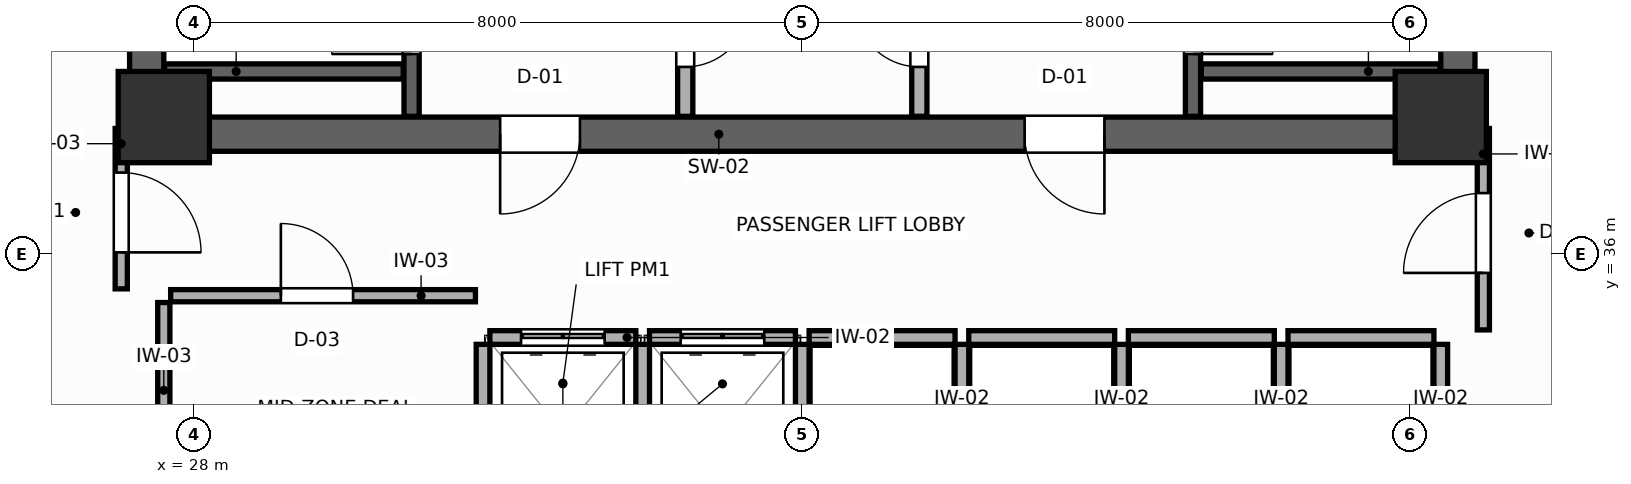
"""IFC4 building model, lengths in metres.
Left out: names, types, materials, properties, quantities, classifications, styles, units other than length and angle.
Written with IfcOpenShell. Run it as: python <this file> out.ifc"""

import sys

from ifc_helpers import new_model, si_unit, direction, frame, frame_2d, origin, origin_2d, place, context, subcontext, project, spatial, rectangle, extrude, source, transform, mapped, element, fill, save


model = new_model("IFC4")
c1 = context("Model", 3, precision=1e-05, world=origin(), true_north=direction((0.0, 1.0)))
c2 = subcontext(c1, "Body", "Model", "MODEL_VIEW")
j1 = project(units=[si_unit("LENGTHUNIT", "METRE"), si_unit("PLANEANGLEUNIT", "RADIAN")], contexts=[c1])
p1 = place(None, origin())
s1 = spatial("IfcSite", under=j1, at=p1, CompositionType="ELEMENT")
p2 = place(p1, origin())
s2 = spatial("IfcBuilding", under=s1, at=p2, CompositionType="ELEMENT")
p3 = place(p2, frame((0.0, 0.0, 109.8)))
s3 = spatial("IfcBuildingStorey", under=s2, at=p3, CompositionType="ELEMENT", Elevation=109.8)
p4 = place(p3, frame((27.15, 37.575, 0.0), z_axis=(0.0, 0.0, 1.0), x_axis=(1.0, 0.0, 0.0)))
e1 = element("IfcWall", 1, at=p4, inside=s3, PredefinedType="SHEAR", context=c2, shape_type="SweptSolid", body=[
    extrude(rectangle(XDim=17.7, YDim=0.45, at=frame_2d((8.85, 0.0))), origin(), (0.0, 0.0, 1.0), 3.6),
])
p5 = place(p4, frame((4.875, 0.0, 0.0)))
e2 = element("IfcOpeningElement", 2, at=p5, cuts=e1, PredefinedType="OPENING", context=c2, shape_type="SweptSolid", body=[
    extrude(rectangle(XDim=1.05, YDim=2.1, at=frame_2d((0.525, 1.05))), frame((0.0, 0.235, 0.0), z_axis=(0.0, -1.0, 0.0), x_axis=(1.0, 0.0, 0.0)), (0.0, 0.0, 1.0), 0.47),
])
p6 = place(p4, frame((11.775, 0.0, 0.0)))
e3 = element("IfcOpeningElement", 3, at=p6, cuts=e1, PredefinedType="OPENING", context=c2, shape_type="SweptSolid", body=[
    extrude(rectangle(XDim=1.05, YDim=2.1, at=frame_2d((0.525, 1.05))), frame((0.0, 0.235, 0.0), z_axis=(0.0, -1.0, 0.0), x_axis=(1.0, 0.0, 0.0)), (0.0, 0.0, 1.0), 0.47),
])
for number, where, z_axis, x_axis in (
    (4, (27.375, 37.8, 0.0), (0.0, 0.0, 1.0), (0.0, 1.0, 0.0)),
    (5, (44.625, 37.8, 0.0), (0.0, 0.0, 1.0), (0.0, 1.0, 0.0)),
):
    element("IfcWall", number, at=place(p3, frame(where, z_axis=z_axis, x_axis=x_axis)), inside=s3, PredefinedType="SHEAR", context=c2, shape_type="SweptSolid", body=[
        extrude(rectangle(XDim=9.0, YDim=0.45, at=frame_2d((4.5, 0.0))), origin(), (0.0, 0.0, 1.0), 3.6),
    ])
m1 = source(origin(), c2, "Body", "SweptSolid", [
    extrude(rectangle(XDim=1.2, YDim=1.2, at=origin_2d()), origin(), (0.0, 0.0, 1.0), 3.6),
])
for number, where, z_axis, x_axis in (
    (6, (27.6, 37.8, 0.0), (0.0, 0.0, 1.0), (1.0, 0.0, 0.0)),
    (7, (44.4, 37.8, 0.0), (0.0, 0.0, 1.0), (1.0, 0.0, 0.0)),
):
    element("IfcColumn", number, at=place(p3, frame(where, z_axis=z_axis, x_axis=x_axis)), inside=s3, PredefinedType="COLUMN", context=c2, shape_type="MappedRepresentation", body=[
        mapped(m1, transform((0.0, 0.0, 0.0), scale=1.0)),
    ])
p7 = place(p3, frame((30.86, 37.81, 0.0), z_axis=(0.0, 0.0, 1.0), x_axis=(0.0, 1.0, 0.0)))
e8 = element("IfcWall", 8, at=p7, inside=s3, PredefinedType="SHEAR", context=c2, shape_type="SweptSolid", body=[
    extrude(rectangle(XDim=8.98, YDim=0.2, at=frame_2d((4.49, 0.0))), origin(), (0.0, 0.0, 1.0), 3.6),
])
p8 = place(p7, frame((0.82, 0.0, 0.0)))
e9 = element("IfcOpeningElement", 9, at=p8, cuts=e8, PredefinedType="OPENING", context=c2, shape_type="SweptSolid", body=[
    extrude(rectangle(XDim=1.05, YDim=2.1, at=frame_2d((0.525, 1.05))), frame((0.0, 0.11, 0.0), z_axis=(0.0, -1.0, 0.0), x_axis=(1.0, 0.0, 0.0)), (0.0, 0.0, 1.0), 0.22),
])
p9 = place(p3, frame((27.61, 38.4, 0.0), z_axis=(0.0, 0.0, 1.0), x_axis=(1.0, 0.0, 0.0)))
e10 = element("IfcWall", 10, at=p9, inside=s3, PredefinedType="SHEAR", context=c2, shape_type="SweptSolid", body=[
    extrude(rectangle(XDim=3.14, YDim=0.2, at=frame_2d((1.57, 0.0))), origin(), (0.0, 0.0, 1.0), 3.6),
])
p10 = place(p3, frame((41.14, 37.81, 0.0), z_axis=(0.0, 0.0, 1.0), x_axis=(0.0, 1.0, 0.0)))
e11 = element("IfcWall", 11, at=p10, inside=s3, PredefinedType="SHEAR", context=c2, shape_type="SweptSolid", body=[
    extrude(rectangle(XDim=8.98, YDim=0.2, at=frame_2d((4.49, 0.0))), origin(), (0.0, 0.0, 1.0), 3.6),
])
p11 = place(p10, frame((0.82, 0.0, 0.0)))
e12 = element("IfcOpeningElement", 12, at=p11, cuts=e11, PredefinedType="OPENING", context=c2, shape_type="SweptSolid", body=[
    extrude(rectangle(XDim=1.05, YDim=2.1, at=frame_2d((0.525, 1.05))), frame((0.0, 0.11, 0.0), z_axis=(0.0, -1.0, 0.0), x_axis=(1.0, 0.0, 0.0)), (0.0, 0.0, 1.0), 0.22),
])
p12 = place(p3, frame((41.25, 38.4, 0.0), z_axis=(0.0, 0.0, 1.0), x_axis=(1.0, 0.0, 0.0)))
e13 = element("IfcWall", 13, at=p12, inside=s3, PredefinedType="SHEAR", context=c2, shape_type="SweptSolid", body=[
    extrude(rectangle(XDim=3.14, YDim=0.2, at=frame_2d((1.57, 0.0))), origin(), (0.0, 0.0, 1.0), 3.6),
])
p13 = place(p3, frame((34.46, 37.81, 0.0), z_axis=(0.0, 0.0, 1.0), x_axis=(0.0, 1.0, 0.0)))
e14 = element("IfcWall", 14, at=p13, inside=s3, PredefinedType="PARTITIONING", context=c2, shape_type="SweptSolid", body=[
    extrude(rectangle(XDim=8.98, YDim=0.2, at=frame_2d((4.49, 0.0))), origin(), (0.0, 0.0, 1.0), 3.4),
])
p14 = place(p13, frame((0.65, 0.0, 0.0)))
e15 = element("IfcOpeningElement", 15, at=p14, cuts=e14, PredefinedType="OPENING", context=c2, shape_type="SweptSolid", body=[
    extrude(rectangle(XDim=0.85, YDim=2.05, at=frame_2d((0.425, 1.025))), frame((0.0, 0.11, 0.0), z_axis=(0.0, -1.0, 0.0), x_axis=(1.0, 0.0, 0.0)), (0.0, 0.0, 1.0), 0.22),
])
p15 = place(p3, frame((37.54, 37.81, 0.0), z_axis=(0.0, 0.0, 1.0), x_axis=(0.0, 1.0, 0.0)))
e16 = element("IfcWall", 16, at=p15, inside=s3, PredefinedType="PARTITIONING", context=c2, shape_type="SweptSolid", body=[
    extrude(rectangle(XDim=8.98, YDim=0.2, at=frame_2d((4.49, 0.0))), origin(), (0.0, 0.0, 1.0), 3.4),
])
p16 = place(p15, frame((0.65, 0.0, 0.0)))
e17 = element("IfcOpeningElement", 17, at=p16, cuts=e16, PredefinedType="OPENING", context=c2, shape_type="SweptSolid", body=[
    extrude(rectangle(XDim=0.85, YDim=2.05, at=frame_2d((0.425, 1.025))), frame((0.0, 0.11, 0.0), z_axis=(0.0, -1.0, 0.0), x_axis=(1.0, 0.0, 0.0)), (0.0, 0.0, 1.0), 0.22),
])
p17 = place(p3, frame((31.89, 34.9, 0.0), z_axis=(0.0, 0.0, 1.0), x_axis=(1.0, 0.0, 0.0)))
e18 = element("IfcWall", 18, at=p17, inside=s3, PredefinedType="PARTITIONING", context=c2, shape_type="SweptSolid", body=[
    extrude(rectangle(XDim=1.92, YDim=0.18, at=frame_2d((0.96, 0.0))), origin(), (0.0, 0.0, 1.0), 3.4),
])
p18 = place(p17, frame((0.41, 0.0, 0.0)))
e19 = element("IfcOpeningElement", 19, at=p18, cuts=e18, PredefinedType="OPENING", context=c2, shape_type="SweptSolid", body=[
    extrude(rectangle(XDim=1.1, YDim=2.1, at=frame_2d((0.55, 1.05))), frame((0.0, 0.1, 0.0), z_axis=(0.0, -1.0, 0.0), x_axis=(1.0, 0.0, 0.0)), (0.0, 0.0, 1.0), 0.2),
])
p19 = place(p3, frame((31.8, 32.49, 0.0), z_axis=(0.0, 0.0, 1.0), x_axis=(0.0, 1.0, 0.0)))
e20 = element("IfcWall", 20, at=p19, inside=s3, PredefinedType="PARTITIONING", context=c2, shape_type="SweptSolid", body=[
    extrude(rectangle(XDim=2.32, YDim=0.18, at=frame_2d((1.16, 0.0))), origin(), (0.0, 0.0, 1.0), 3.4),
])
p20 = place(p3, frame((33.99, 34.9, 0.0), z_axis=(0.0, 0.0, 1.0), x_axis=(1.0, 0.0, 0.0)))
e21 = element("IfcWall", 21, at=p20, inside=s3, PredefinedType="PARTITIONING", context=c2, shape_type="SweptSolid", body=[
    extrude(rectangle(XDim=1.92, YDim=0.18, at=frame_2d((0.96, 0.0))), origin(), (0.0, 0.0, 1.0), 3.4),
])
p21 = place(p20, frame((0.41, 0.0, 0.0)))
e22 = element("IfcOpeningElement", 22, at=p21, cuts=e21, PredefinedType="OPENING", context=c2, shape_type="SweptSolid", body=[
    extrude(rectangle(XDim=1.1, YDim=2.1, at=frame_2d((0.55, 1.05))), frame((0.0, 0.1, 0.0), z_axis=(0.0, -1.0, 0.0), x_axis=(1.0, 0.0, 0.0)), (0.0, 0.0, 1.0), 0.2),
])
p22 = place(p3, frame((33.9, 32.49, 0.0), z_axis=(0.0, 0.0, 1.0), x_axis=(0.0, 1.0, 0.0)))
e23 = element("IfcWall", 23, at=p22, inside=s3, PredefinedType="PARTITIONING", context=c2, shape_type="SweptSolid", body=[
    extrude(rectangle(XDim=2.32, YDim=0.18, at=frame_2d((1.16, 0.0))), origin(), (0.0, 0.0, 1.0), 3.4),
])
p23 = place(p3, frame((36.09, 34.9, 0.0), z_axis=(0.0, 0.0, 1.0), x_axis=(1.0, 0.0, 0.0)))
e24 = element("IfcWall", 24, at=p23, inside=s3, PredefinedType="PARTITIONING", context=c2, shape_type="SweptSolid", body=[
    extrude(rectangle(XDim=1.92, YDim=0.18, at=frame_2d((0.96, 0.0))), origin(), (0.0, 0.0, 1.0), 3.4),
])
p24 = place(p3, frame((36.0, 32.49, 0.0), z_axis=(0.0, 0.0, 1.0), x_axis=(0.0, 1.0, 0.0)))
e25 = element("IfcWall", 25, at=p24, inside=s3, PredefinedType="PARTITIONING", context=c2, shape_type="SweptSolid", body=[
    extrude(rectangle(XDim=2.32, YDim=0.18, at=frame_2d((1.16, 0.0))), origin(), (0.0, 0.0, 1.0), 3.4),
])
p25 = place(p3, frame((38.19, 34.9, 0.0), z_axis=(0.0, 0.0, 1.0), x_axis=(1.0, 0.0, 0.0)))
e26 = element("IfcWall", 26, at=p25, inside=s3, PredefinedType="PARTITIONING", context=c2, shape_type="SweptSolid", body=[
    extrude(rectangle(XDim=1.92, YDim=0.18, at=frame_2d((0.96, 0.0))), origin(), (0.0, 0.0, 1.0), 3.4),
])
p26 = place(p3, frame((38.1, 32.49, 0.0), z_axis=(0.0, 0.0, 1.0), x_axis=(0.0, 1.0, 0.0)))
e27 = element("IfcWall", 27, at=p26, inside=s3, PredefinedType="PARTITIONING", context=c2, shape_type="SweptSolid", body=[
    extrude(rectangle(XDim=2.32, YDim=0.18, at=frame_2d((1.16, 0.0))), origin(), (0.0, 0.0, 1.0), 3.4),
])
p27 = place(p3, frame((40.29, 34.9, 0.0), z_axis=(0.0, 0.0, 1.0), x_axis=(1.0, 0.0, 0.0)))
e28 = element("IfcWall", 28, at=p27, inside=s3, PredefinedType="PARTITIONING", context=c2, shape_type="SweptSolid", body=[
    extrude(rectangle(XDim=1.92, YDim=0.18, at=frame_2d((0.96, 0.0))), origin(), (0.0, 0.0, 1.0), 3.4),
])
p28 = place(p3, frame((40.2, 32.49, 0.0), z_axis=(0.0, 0.0, 1.0), x_axis=(0.0, 1.0, 0.0)))
e29 = element("IfcWall", 29, at=p28, inside=s3, PredefinedType="PARTITIONING", context=c2, shape_type="SweptSolid", body=[
    extrude(rectangle(XDim=2.32, YDim=0.18, at=frame_2d((1.16, 0.0))), origin(), (0.0, 0.0, 1.0), 3.4),
])
p29 = place(p3, frame((42.39, 34.9, 0.0), z_axis=(0.0, 0.0, 1.0), x_axis=(1.0, 0.0, 0.0)))
e30 = element("IfcWall", 30, at=p29, inside=s3, PredefinedType="PARTITIONING", context=c2, shape_type="SweptSolid", body=[
    extrude(rectangle(XDim=1.92, YDim=0.18, at=frame_2d((0.96, 0.0))), origin(), (0.0, 0.0, 1.0), 3.4),
])
for number, where, z_axis, x_axis in (
    (31, (42.3, 32.49, 0.0), (0.0, 0.0, 1.0), (0.0, 1.0, 0.0)),
    (32, (44.4, 32.49, 0.0), (0.0, 0.0, 1.0), (0.0, 1.0, 0.0)),
):
    element("IfcWall", number, at=place(p3, frame(where, z_axis=z_axis, x_axis=x_axis)), inside=s3, PredefinedType="PARTITIONING", context=c2, shape_type="SweptSolid", body=[
        extrude(rectangle(XDim=2.32, YDim=0.18, at=frame_2d((1.16, 0.0))), origin(), (0.0, 0.0, 1.0), 3.4),
    ])
p30 = place(p3, frame((27.6, 33.05, 0.0), z_axis=(0.0, 0.0, 1.0), x_axis=(0.0, 1.0, 0.0)))
e33 = element("IfcWall", 33, at=p30, inside=s3, PredefinedType="PARTITIONING", context=c2, shape_type="SweptSolid", body=[
    extrude(rectangle(XDim=2.31, YDim=0.16, at=frame_2d((1.155, 0.0))), origin(), (0.0, 0.0, 1.0), 3.4),
])
p31 = place(p3, frame((27.69, 35.45, 0.0), z_axis=(0.0, 0.0, 1.0), x_axis=(1.0, 0.0, 0.0)))
e34 = element("IfcWall", 34, at=p31, inside=s3, PredefinedType="PARTITIONING", context=c2, shape_type="SweptSolid", body=[
    extrude(rectangle(XDim=4.01, YDim=0.16, at=frame_2d((2.005, 0.0))), origin(), (0.0, 0.0, 1.0), 3.4),
])
p32 = place(p31, frame((1.45, 0.0, 0.0)))
e35 = element("IfcOpeningElement", 35, at=p32, cuts=e34, PredefinedType="OPENING", context=c2, shape_type="SweptSolid", body=[
    extrude(rectangle(XDim=0.95, YDim=2.05, at=frame_2d((0.475, 1.025))), frame((0.0, 0.09, 0.0), z_axis=(0.0, -1.0, 0.0), x_axis=(1.0, 0.0, 0.0)), (0.0, 0.0, 1.0), 0.18),
])
p33 = place(p3, frame((27.04, 35.54, 0.0), z_axis=(0.0, 0.0, 1.0), x_axis=(0.0, 1.0, 0.0)))
e36 = element("IfcWall", 36, at=p33, inside=s3, PredefinedType="PARTITIONING", context=c2, shape_type="SweptSolid", body=[
    extrude(rectangle(XDim=2.11, YDim=0.16, at=frame_2d((1.055, 0.0))), origin(), (0.0, 0.0, 1.0), 3.4),
])
p34 = place(p33, frame((0.48, 0.0, 0.0)))
e37 = element("IfcOpeningElement", 37, at=p34, cuts=e36, PredefinedType="OPENING", context=c2, shape_type="SweptSolid", body=[
    extrude(rectangle(XDim=1.05, YDim=2.1, at=frame_2d((0.525, 1.05))), frame((0.0, 0.09, 0.0), z_axis=(0.0, -1.0, 0.0), x_axis=(1.0, 0.0, 0.0)), (0.0, 0.0, 1.0), 0.18),
])
p35 = place(p3, frame((44.96, 35.0, 0.0), z_axis=(0.0, 0.0, 1.0), x_axis=(0.0, 1.0, 0.0)))
e38 = element("IfcWall", 38, at=p35, inside=s3, PredefinedType="PARTITIONING", context=c2, shape_type="SweptSolid", body=[
    extrude(rectangle(XDim=2.65, YDim=0.16, at=frame_2d((1.325, 0.0))), origin(), (0.0, 0.0, 1.0), 3.4),
])
p36 = place(p35, frame((0.75, 0.0, 0.0)))
e39 = element("IfcOpeningElement", 39, at=p36, cuts=e38, PredefinedType="OPENING", context=c2, shape_type="SweptSolid", body=[
    extrude(rectangle(XDim=1.05, YDim=2.1, at=frame_2d((0.525, 1.05))), frame((0.0, 0.09, 0.0), z_axis=(0.0, -1.0, 0.0), x_axis=(1.0, 0.0, 0.0)), (0.0, 0.0, 1.0), 0.18),
])
p37 = place(p8, origin())
e40 = element("IfcDoor", 40, at=p37, inside=s3, OperationType="SINGLE_SWING_LEFT", PredefinedType="DOOR", context=c2, shape_type="SweptSolid", body=[
    extrude(rectangle(XDim=1.05, YDim=2.1, at=frame_2d((0.525, 1.05))), frame((0.0, 0.025, 0.0), z_axis=(0.0, -1.0, 0.0), x_axis=(1.0, 0.0, 0.0)), (0.0, 0.0, 1.0), 0.05),
])
fill(e9, e40)
p38 = place(p11, frame((1.05, 0.0, 0.0), z_axis=(0.0, 0.0, 1.0), x_axis=(-1.0, 0.0, 0.0)))
e41 = element("IfcDoor", 41, at=p38, inside=s3, OperationType="SINGLE_SWING_RIGHT", PredefinedType="DOOR", context=c2, shape_type="SweptSolid", body=[
    extrude(rectangle(XDim=1.05, YDim=2.1, at=frame_2d((0.525, 1.05))), frame((0.0, 0.025, 0.0), z_axis=(0.0, -1.0, 0.0), x_axis=(1.0, 0.0, 0.0)), (0.0, 0.0, 1.0), 0.05),
])
fill(e12, e41)
p39 = place(p14, frame((0.85, 0.0, 0.0), z_axis=(0.0, 0.0, 1.0), x_axis=(-1.0, 0.0, 0.0)))
e42 = element("IfcDoor", 42, at=p39, inside=s3, OperationType="SINGLE_SWING_LEFT", PredefinedType="DOOR", context=c2, shape_type="SweptSolid", body=[
    extrude(rectangle(XDim=0.85, YDim=2.05, at=frame_2d((0.425, 1.025))), frame((0.0, 0.025, 0.0), z_axis=(0.0, -1.0, 0.0), x_axis=(1.0, 0.0, 0.0)), (0.0, 0.0, 1.0), 0.05),
])
fill(e15, e42)
p40 = place(p16, origin())
e43 = element("IfcDoor", 43, at=p40, inside=s3, OperationType="SINGLE_SWING_RIGHT", PredefinedType="DOOR", context=c2, shape_type="SweptSolid", body=[
    extrude(rectangle(XDim=0.85, YDim=2.05, at=frame_2d((0.425, 1.025))), frame((0.0, 0.025, 0.0), z_axis=(0.0, -1.0, 0.0), x_axis=(1.0, 0.0, 0.0)), (0.0, 0.0, 1.0), 0.05),
])
fill(e17, e43)
p41 = place(p18, origin())
e44 = element("IfcDoor", 44, at=p41, inside=s3, OperationType="DOUBLE_DOOR_SLIDING", PredefinedType="DOOR", context=c2, shape_type="SweptSolid", body=[
    extrude(rectangle(XDim=1.1, YDim=2.1, at=frame_2d((0.55, 1.05))), frame((0.0, 0.025, 0.0), z_axis=(0.0, -1.0, 0.0), x_axis=(1.0, 0.0, 0.0)), (0.0, 0.0, 1.0), 0.05),
])
fill(e19, e44)
p42 = place(p21, origin())
e45 = element("IfcDoor", 45, at=p42, inside=s3, OperationType="DOUBLE_DOOR_SLIDING", PredefinedType="DOOR", context=c2, shape_type="SweptSolid", body=[
    extrude(rectangle(XDim=1.1, YDim=2.1, at=frame_2d((0.55, 1.05))), frame((0.0, 0.025, 0.0), z_axis=(0.0, -1.0, 0.0), x_axis=(1.0, 0.0, 0.0)), (0.0, 0.0, 1.0), 0.05),
])
fill(e22, e45)
p43 = place(p32, origin())
e46 = element("IfcDoor", 46, at=p43, inside=s3, OperationType="SINGLE_SWING_LEFT", PredefinedType="DOOR", context=c2, shape_type="SweptSolid", body=[
    extrude(rectangle(XDim=0.95, YDim=2.05, at=frame_2d((0.475, 1.025))), frame((0.0, 0.025, 0.0), z_axis=(0.0, -1.0, 0.0), x_axis=(1.0, 0.0, 0.0)), (0.0, 0.0, 1.0), 0.05),
])
fill(e35, e46)
p44 = place(p34, frame((1.05, 0.0, 0.0), z_axis=(0.0, 0.0, 1.0), x_axis=(-1.0, 0.0, 0.0)))
e47 = element("IfcDoor", 47, at=p44, inside=s3, OperationType="SINGLE_SWING_RIGHT", PredefinedType="DOOR", context=c2, shape_type="SweptSolid", body=[
    extrude(rectangle(XDim=1.05, YDim=2.1, at=frame_2d((0.525, 1.05))), frame((0.0, 0.025, 0.0), z_axis=(0.0, -1.0, 0.0), x_axis=(1.0, 0.0, 0.0)), (0.0, 0.0, 1.0), 0.05),
])
fill(e37, e47)
p45 = place(p36, origin())
e48 = element("IfcDoor", 48, at=p45, inside=s3, OperationType="SINGLE_SWING_LEFT", PredefinedType="DOOR", context=c2, shape_type="SweptSolid", body=[
    extrude(rectangle(XDim=1.05, YDim=2.1, at=frame_2d((0.525, 1.05))), frame((0.0, 0.025, 0.0), z_axis=(0.0, -1.0, 0.0), x_axis=(1.0, 0.0, 0.0)), (0.0, 0.0, 1.0), 0.05),
])
fill(e39, e48)
p46 = place(p5, frame((1.05, 0.0, 0.0), z_axis=(0.0, 0.0, 1.0), x_axis=(-1.0, 0.0, 0.0)))
e49 = element("IfcDoor", 49, at=p46, inside=s3, OperationType="SINGLE_SWING_RIGHT", PredefinedType="DOOR", context=c2, shape_type="SweptSolid", body=[
    extrude(rectangle(XDim=1.05, YDim=2.1, at=frame_2d((0.525, 1.05))), frame((0.0, 0.025, 0.0), z_axis=(0.0, -1.0, 0.0), x_axis=(1.0, 0.0, 0.0)), (0.0, 0.0, 1.0), 0.05),
])
fill(e2, e49)
p47 = place(p6, frame((1.05, 0.0, 0.0), z_axis=(0.0, 0.0, 1.0), x_axis=(-1.0, 0.0, 0.0)))
e50 = element("IfcDoor", 50, at=p47, inside=s3, OperationType="SINGLE_SWING_LEFT", PredefinedType="DOOR", context=c2, shape_type="SweptSolid", body=[
    extrude(rectangle(XDim=1.05, YDim=2.1, at=frame_2d((0.525, 1.05))), frame((0.0, 0.025, 0.0), z_axis=(0.0, -1.0, 0.0), x_axis=(1.0, 0.0, 0.0)), (0.0, 0.0, 1.0), 0.05),
])
fill(e3, e50)
save(model, sys.argv[1])
